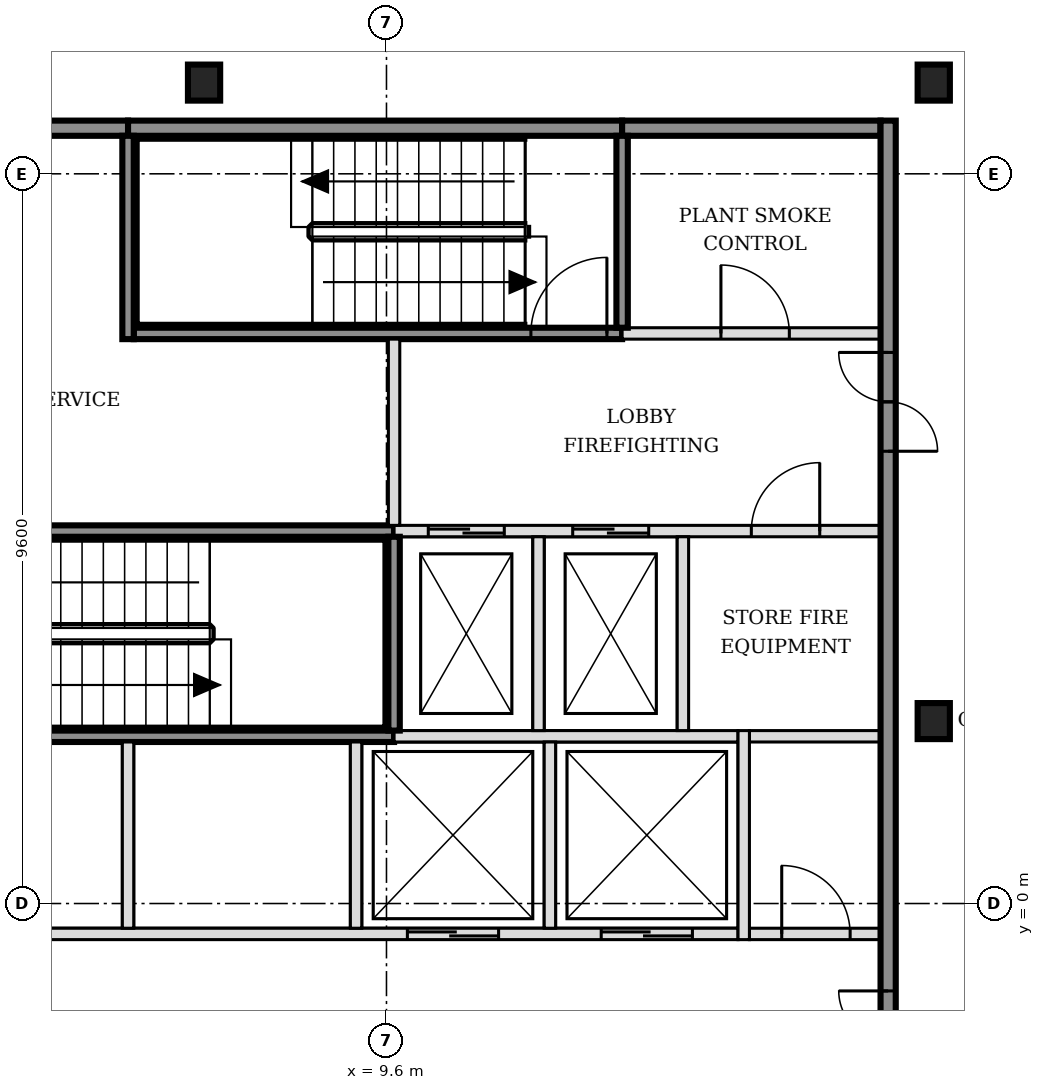
"""IFC4 building model, lengths in metres.
Left out: names, types, materials, properties, quantities, classifications, styles, units other than length and angle.
Written with IfcOpenShell. Run it as: python <this file> out.ifc"""

import sys

from ifc_helpers import new_model, si_unit, direction, frame, frame_2d, origin, origin_2d, place, context, subcontext, project, spatial, rectangle, i_section, extrude, element, fill, save


model = new_model("IFC4")
c1 = context("Model", 3, precision=1e-05, world=origin(), true_north=direction((0.0, 1.0)))
c2 = subcontext(c1, "Body", "Model", "MODEL_VIEW")
j1 = project(units=[si_unit("LENGTHUNIT", "METRE"), si_unit("PLANEANGLEUNIT", "RADIAN")], contexts=[c1])
p1 = place(None, origin())
s1 = spatial("IfcSite", under=j1, at=p1, CompositionType="ELEMENT")
p2 = place(p1, origin())
s2 = spatial("IfcBuilding", under=s1, at=p2, CompositionType="ELEMENT")
p3 = place(p2, frame((0.0, 0.0, 108.6)))
s3 = spatial("IfcBuildingStorey", under=s2, at=p3, CompositionType="ELEMENT", Elevation=108.6)
for number, where, z_axis, x_axis in (
    (1, (16.8, 2.4, -0.15), (0.0, 0.0, 1.0), (1.0, 0.0, 0.0)),
    (2, (7.2, 10.8, -0.15), (0.0, 0.0, 1.0), (1.0, 0.0, 0.0)),
    (3, (16.8, 10.8, -0.15), (0.0, 0.0, 1.0), (1.0, 0.0, 0.0)),
):
    element("IfcColumn", number, at=place(p3, frame(where, z_axis=z_axis, x_axis=x_axis)), inside=s3, PredefinedType="COLUMN", context=c2, shape_type="SweptSolid", body=[
        extrude(i_section(OverallWidth=0.424, OverallDepth=0.474, WebThickness=0.048, FlangeThickness=0.077, FilletRadius=0.015, at=origin_2d()), origin(), (0.0, 0.0, 1.0), 3.6),
    ])
p4 = place(p3, frame((-1.7, -0.4, 0.0), z_axis=(0.0, 0.0, 1.0), x_axis=(1.0, 0.0, 0.0)))
e4 = element("IfcWall", 4, at=p4, inside=s3, PredefinedType="SOLIDWALL", context=c2, shape_type="SweptSolid", body=[
    extrude(rectangle(XDim=15.925, YDim=0.15, at=frame_2d((7.962, 0.0))), origin(), (0.0, 0.0, 1.0), 3.45),
])
p5 = place(p4, frame((0.6, 0.0, 0.0)))
e5 = element("IfcOpeningElement", 5, at=p5, cuts=e4, PredefinedType="OPENING", context=c2, shape_type="SweptSolid", body=[
    extrude(rectangle(XDim=1.1, YDim=2.1, at=frame_2d((0.55, 1.05))), frame((0.0, 0.085, 0.0), z_axis=(0.0, -1.0, 0.0), x_axis=(1.0, 0.0, 0.0)), (0.0, 0.0, 1.0), 0.17),
])
p6 = place(p4, frame((3.1, 0.0, 0.0)))
e6 = element("IfcOpeningElement", 6, at=p6, cuts=e4, PredefinedType="OPENING", context=c2, shape_type="SweptSolid", body=[
    extrude(rectangle(XDim=1.1, YDim=2.1, at=frame_2d((0.55, 1.05))), frame((0.0, 0.085, 0.0), z_axis=(0.0, -1.0, 0.0), x_axis=(1.0, 0.0, 0.0)), (0.0, 0.0, 1.0), 0.17),
])
p7 = place(p4, frame((11.575, 0.0, 0.0)))
e7 = element("IfcOpeningElement", 7, at=p7, cuts=e4, PredefinedType="OPENING", context=c2, shape_type="SweptSolid", body=[
    extrude(rectangle(XDim=1.2, YDim=2.1, at=frame_2d((0.6, 1.05))), frame((0.0, 0.085, 0.0), z_axis=(0.0, -1.0, 0.0), x_axis=(1.0, 0.0, 0.0)), (0.0, 0.0, 1.0), 0.17),
])
p8 = place(p4, frame((14.125, 0.0, 0.0)))
e8 = element("IfcOpeningElement", 8, at=p8, cuts=e4, PredefinedType="OPENING", context=c2, shape_type="SweptSolid", body=[
    extrude(rectangle(XDim=1.2, YDim=2.1, at=frame_2d((0.6, 1.05))), frame((0.0, 0.085, 0.0), z_axis=(0.0, -1.0, 0.0), x_axis=(1.0, 0.0, 0.0)), (0.0, 0.0, 1.0), 0.17),
])
p9 = place(p3, frame((14.375, -0.4, 0.0), z_axis=(0.0, 0.0, 1.0), x_axis=(1.0, 0.0, 0.0)))
e9 = element("IfcWall", 9, at=p9, inside=s3, PredefinedType="PARTITIONING", context=c2, shape_type="SweptSolid", body=[
    extrude(rectangle(XDim=1.725, YDim=0.15, at=frame_2d((0.863, 0.0))), origin(), (0.0, 0.0, 1.0), 3.45),
])
p10 = place(p9, frame((0.425, 0.0, 0.0)))
e10 = element("IfcOpeningElement", 10, at=p10, cuts=e9, PredefinedType="OPENING", context=c2, shape_type="SweptSolid", body=[
    extrude(rectangle(XDim=0.9, YDim=2.1, at=frame_2d((0.45, 1.05))), frame((0.0, 0.085, 0.0), z_axis=(0.0, -1.0, 0.0), x_axis=(1.0, 0.0, 0.0)), (0.0, 0.0, 1.0), 0.17),
])
p11 = place(p3, frame((3.2, 2.2, 0.0), z_axis=(0.0, 0.0, 1.0), x_axis=(1.0, 0.0, 0.0)))
e11 = element("IfcWall", 11, at=p11, inside=s3, PredefinedType="SOLIDWALL", context=c2, shape_type="SweptSolid", body=[
    extrude(rectangle(XDim=6.5, YDim=0.15, at=frame_2d((3.25, 0.0))), origin(), (0.0, 0.0, 1.0), 3.45),
])
p12 = place(p3, frame((9.7, 2.2, 0.0), z_axis=(0.0, 0.0, 1.0), x_axis=(1.0, 0.0, 0.0)))
e12 = element("IfcWall", 12, at=p12, inside=s3, PredefinedType="SOLIDWALL", context=c2, shape_type="SweptSolid", body=[
    extrude(rectangle(XDim=4.525, YDim=0.15, at=frame_2d((2.263, 0.0))), origin(), (0.0, 0.0, 1.0), 3.45),
])
p13 = place(p3, frame((14.375, 2.2, 0.0), z_axis=(0.0, 0.0, 1.0), x_axis=(1.0, 0.0, 0.0)))
e13 = element("IfcWall", 13, at=p13, inside=s3, PredefinedType="PARTITIONING", context=c2, shape_type="SweptSolid", body=[
    extrude(rectangle(XDim=1.725, YDim=0.15, at=frame_2d((0.863, 0.0))), origin(), (0.0, 0.0, 1.0), 3.45),
])
p14 = place(p3, frame((3.275, 4.9, 0.0), z_axis=(0.0, 0.0, 1.0), x_axis=(1.0, 0.0, 0.0)))
e14 = element("IfcWall", 14, at=p14, inside=s3, PredefinedType="SOLIDWALL", context=c2, shape_type="SweptSolid", body=[
    extrude(rectangle(XDim=6.425, YDim=0.15, at=frame_2d((3.212, 0.0))), origin(), (0.0, 0.0, 1.0), 3.45),
])
p15 = place(p14, frame((0.1, 0.0, 0.0)))
e15 = element("IfcOpeningElement", 15, at=p15, cuts=e14, PredefinedType="OPENING", context=c2, shape_type="SweptSolid", body=[
    extrude(rectangle(XDim=1.0, YDim=2.1, at=frame_2d((0.5, 1.05))), frame((0.0, 0.085, 0.0), z_axis=(0.0, -1.0, 0.0), x_axis=(1.0, 0.0, 0.0)), (0.0, 0.0, 1.0), 0.17),
])
p16 = place(p3, frame((9.7, 4.9, 0.0), z_axis=(0.0, 0.0, 1.0), x_axis=(1.0, 0.0, 0.0)))
e16 = element("IfcWall", 16, at=p16, inside=s3, PredefinedType="SOLIDWALL", context=c2, shape_type="SweptSolid", body=[
    extrude(rectangle(XDim=6.4, YDim=0.15, at=frame_2d((3.2, 0.0))), origin(), (0.0, 0.0, 1.0), 3.45),
])
p17 = place(p16, frame((0.45, 0.0, 0.0)))
e17 = element("IfcOpeningElement", 17, at=p17, cuts=e16, PredefinedType="OPENING", context=c2, shape_type="SweptSolid", body=[
    extrude(rectangle(XDim=1.0, YDim=2.1, at=frame_2d((0.5, 1.05))), frame((0.0, 0.085, 0.0), z_axis=(0.0, -1.0, 0.0), x_axis=(1.0, 0.0, 0.0)), (0.0, 0.0, 1.0), 0.17),
])
p18 = place(p16, frame((2.35, 0.0, 0.0)))
e18 = element("IfcOpeningElement", 18, at=p18, cuts=e16, PredefinedType="OPENING", context=c2, shape_type="SweptSolid", body=[
    extrude(rectangle(XDim=1.0, YDim=2.1, at=frame_2d((0.5, 1.05))), frame((0.0, 0.085, 0.0), z_axis=(0.0, -1.0, 0.0), x_axis=(1.0, 0.0, 0.0)), (0.0, 0.0, 1.0), 0.17),
])
p19 = place(p16, frame((4.7, 0.0, 0.0)))
e19 = element("IfcOpeningElement", 19, at=p19, cuts=e16, PredefinedType="OPENING", context=c2, shape_type="SweptSolid", body=[
    extrude(rectangle(XDim=0.9, YDim=2.1, at=frame_2d((0.45, 1.05))), frame((0.0, 0.085, 0.0), z_axis=(0.0, -1.0, 0.0), x_axis=(1.0, 0.0, 0.0)), (0.0, 0.0, 1.0), 0.17),
])
p20 = place(p3, frame((6.275, 7.5, 0.0), z_axis=(0.0, 0.0, 1.0), x_axis=(1.0, 0.0, 0.0)))
e20 = element("IfcWall", 20, at=p20, inside=s3, PredefinedType="SOLIDWALL", context=c2, shape_type="SweptSolid", body=[
    extrude(rectangle(XDim=6.425, YDim=0.15, at=frame_2d((3.212, 0.0))), origin(), (0.0, 0.0, 1.0), 3.45),
])
p21 = place(p20, frame((5.225, 0.0, 0.0)))
e21 = element("IfcOpeningElement", 21, at=p21, cuts=e20, PredefinedType="OPENING", context=c2, shape_type="SweptSolid", body=[
    extrude(rectangle(XDim=1.0, YDim=2.1, at=frame_2d((0.5, 1.05))), frame((0.0, 0.085, 0.0), z_axis=(0.0, -1.0, 0.0), x_axis=(1.0, 0.0, 0.0)), (0.0, 0.0, 1.0), 0.17),
])
p22 = place(p3, frame((12.7, 7.5, 0.0), z_axis=(0.0, 0.0, 1.0), x_axis=(1.0, 0.0, 0.0)))
e22 = element("IfcWall", 22, at=p22, inside=s3, PredefinedType="SOLIDWALL", context=c2, shape_type="SweptSolid", body=[
    extrude(rectangle(XDim=3.4, YDim=0.15, at=frame_2d((1.7, 0.0))), origin(), (0.0, 0.0, 1.0), 3.45),
])
p23 = place(p22, frame((1.3, 0.0, 0.0)))
e23 = element("IfcOpeningElement", 23, at=p23, cuts=e22, PredefinedType="OPENING", context=c2, shape_type="SweptSolid", body=[
    extrude(rectangle(XDim=0.9, YDim=2.1, at=frame_2d((0.45, 1.05))), frame((0.0, 0.085, 0.0), z_axis=(0.0, -1.0, 0.0), x_axis=(1.0, 0.0, 0.0)), (0.0, 0.0, 1.0), 0.17),
])
p24 = place(p3, frame((-1.7, 10.2, 0.0), z_axis=(0.0, 0.0, 1.0), x_axis=(1.0, 0.0, 0.0)))
e24 = element("IfcWall", 24, at=p24, inside=s3, PredefinedType="SOLIDWALL", context=c2, shape_type="SweptSolid", body=[
    extrude(rectangle(XDim=7.9, YDim=0.2, at=frame_2d((3.95, 0.0))), origin(), (0.0, 0.0, 1.0), 3.45),
])
p25 = place(p3, frame((6.2, 10.2, 0.0), z_axis=(0.0, 0.0, 1.0), x_axis=(1.0, 0.0, 0.0)))
e25 = element("IfcWall", 25, at=p25, inside=s3, PredefinedType="SOLIDWALL", context=c2, shape_type="SweptSolid", body=[
    extrude(rectangle(XDim=6.5, YDim=0.2, at=frame_2d((3.25, 0.0))), origin(), (0.0, 0.0, 1.0), 3.45),
])
p26 = place(p3, frame((12.7, 10.2, 0.0), z_axis=(0.0, 0.0, 1.0), x_axis=(1.0, 0.0, 0.0)))
e26 = element("IfcWall", 26, at=p26, inside=s3, PredefinedType="SOLIDWALL", context=c2, shape_type="SweptSolid", body=[
    extrude(rectangle(XDim=3.4, YDim=0.2, at=frame_2d((1.7, 0.0))), origin(), (0.0, 0.0, 1.0), 3.45),
])
p27 = place(p3, frame((6.2, -0.325, 0.0), z_axis=(0.0, 0.0, 1.0), x_axis=(0.0, 1.0, 0.0)))
e27 = element("IfcWall", 27, at=p27, inside=s3, PredefinedType="SOLIDWALL", context=c2, shape_type="SweptSolid", body=[
    extrude(rectangle(XDim=2.45, YDim=0.15, at=frame_2d((1.225, 0.0))), origin(), (0.0, 0.0, 1.0), 3.45),
])
p28 = place(p3, frame((6.2, 7.425, 0.0), z_axis=(0.0, 0.0, 1.0), x_axis=(0.0, 1.0, 0.0)))
e28 = element("IfcWall", 28, at=p28, inside=s3, PredefinedType="SOLIDWALL", context=c2, shape_type="SweptSolid", body=[
    extrude(rectangle(XDim=2.675, YDim=0.15, at=frame_2d((1.337, 0.0))), origin(), (0.0, 0.0, 1.0), 3.45),
])
p29 = place(p3, frame((9.2, -0.325, 0.0), z_axis=(0.0, 0.0, 1.0), x_axis=(0.0, 1.0, 0.0)))
e29 = element("IfcWall", 29, at=p29, inside=s3, PredefinedType="SOLIDWALL", context=c2, shape_type="SweptSolid", body=[
    extrude(rectangle(XDim=2.45, YDim=0.15, at=frame_2d((1.225, 0.0))), origin(), (0.0, 0.0, 1.0), 3.45),
])
p30 = place(p3, frame((9.7, 2.275, 0.0), z_axis=(0.0, 0.0, 1.0), x_axis=(0.0, 1.0, 0.0)))
e30 = element("IfcWall", 30, at=p30, inside=s3, PredefinedType="SOLIDWALL", context=c2, shape_type="SweptSolid", body=[
    extrude(rectangle(XDim=2.55, YDim=0.15, at=frame_2d((1.275, 0.0))), origin(), (0.0, 0.0, 1.0), 3.45),
])
p31 = place(p3, frame((9.7, 4.975, 0.0), z_axis=(0.0, 0.0, 1.0), x_axis=(0.0, 1.0, 0.0)))
e31 = element("IfcWall", 31, at=p31, inside=s3, PredefinedType="SOLIDWALL", context=c2, shape_type="SweptSolid", body=[
    extrude(rectangle(XDim=2.45, YDim=0.15, at=frame_2d((1.225, 0.0))), origin(), (0.0, 0.0, 1.0), 3.45),
])
p32 = place(p3, frame((11.6, 2.275, 0.0), z_axis=(0.0, 0.0, 1.0), x_axis=(0.0, 1.0, 0.0)))
e32 = element("IfcWall", 32, at=p32, inside=s3, PredefinedType="SOLIDWALL", context=c2, shape_type="SweptSolid", body=[
    extrude(rectangle(XDim=2.55, YDim=0.15, at=frame_2d((1.275, 0.0))), origin(), (0.0, 0.0, 1.0), 3.45),
])
p33 = place(p3, frame((11.75, -0.325, 0.0), z_axis=(0.0, 0.0, 1.0), x_axis=(0.0, 1.0, 0.0)))
e33 = element("IfcWall", 33, at=p33, inside=s3, PredefinedType="SOLIDWALL", context=c2, shape_type="SweptSolid", body=[
    extrude(rectangle(XDim=2.45, YDim=0.15, at=frame_2d((1.225, 0.0))), origin(), (0.0, 0.0, 1.0), 3.45),
])
p34 = place(p3, frame((12.7, 7.575, 0.0), z_axis=(0.0, 0.0, 1.0), x_axis=(0.0, 1.0, 0.0)))
e34 = element("IfcWall", 34, at=p34, inside=s3, PredefinedType="SOLIDWALL", context=c2, shape_type="SweptSolid", body=[
    extrude(rectangle(XDim=2.525, YDim=0.15, at=frame_2d((1.263, 0.0))), origin(), (0.0, 0.0, 1.0), 3.45),
])
p35 = place(p3, frame((13.5, 2.275, 0.0), z_axis=(0.0, 0.0, 1.0), x_axis=(0.0, 1.0, 0.0)))
e35 = element("IfcWall", 35, at=p35, inside=s3, PredefinedType="SOLIDWALL", context=c2, shape_type="SweptSolid", body=[
    extrude(rectangle(XDim=2.55, YDim=0.15, at=frame_2d((1.275, 0.0))), origin(), (0.0, 0.0, 1.0), 3.45),
])
p36 = place(p3, frame((14.3, -0.475, 0.0), z_axis=(0.0, 0.0, 1.0), x_axis=(0.0, 1.0, 0.0)))
e36 = element("IfcWall", 36, at=p36, inside=s3, PredefinedType="SOLIDWALL", context=c2, shape_type="SweptSolid", body=[
    extrude(rectangle(XDim=2.75, YDim=0.15, at=frame_2d((1.375, 0.0))), origin(), (0.0, 0.0, 1.0), 3.45),
])
p37 = place(p3, frame((16.2, -5.5, 0.0), z_axis=(0.0, 0.0, 1.0), x_axis=(0.0, 1.0, 0.0)))
e37 = element("IfcWall", 37, at=p37, inside=s3, PredefinedType="SOLIDWALL", context=c2, shape_type="SweptSolid", body=[
    extrude(rectangle(XDim=15.8, YDim=0.2, at=frame_2d((7.9, 0.0))), origin(), (0.0, 0.0, 1.0), 3.45),
])
p38 = place(p37, frame((3.05, 0.0, 0.0)))
e38 = element("IfcOpeningElement", 38, at=p38, cuts=e37, PredefinedType="OPENING", context=c2, shape_type="SweptSolid", body=[
    extrude(rectangle(XDim=1.3, YDim=2.1, at=frame_2d((0.65, 1.05))), frame((0.0, 0.11, 0.0), z_axis=(0.0, -1.0, 0.0), x_axis=(1.0, 0.0, 0.0)), (0.0, 0.0, 1.0), 0.22),
])
p39 = place(p37, frame((11.45, 0.0, 0.0)))
e39 = element("IfcOpeningElement", 39, at=p39, cuts=e37, PredefinedType="OPENING", context=c2, shape_type="SweptSolid", body=[
    extrude(rectangle(XDim=1.3, YDim=2.1, at=frame_2d((0.65, 1.05))), frame((0.0, 0.11, 0.0), z_axis=(0.0, -1.0, 0.0), x_axis=(1.0, 0.0, 0.0)), (0.0, 0.0, 1.0), 0.22),
])
p40 = place(p7, origin())
e40 = element("IfcDoor", 40, at=p40, inside=s3, OperationType="DOUBLE_DOOR_SLIDING", PredefinedType="DOOR", context=c2, shape_type="SweptSolid", body=[
    extrude(rectangle(XDim=1.2, YDim=2.1, at=frame_2d((0.6, 1.05))), frame((0.0, 0.025, 0.0), z_axis=(0.0, -1.0, 0.0), x_axis=(1.0, 0.0, 0.0)), (0.0, 0.0, 1.0), 0.05),
])
fill(e7, e40)
p41 = place(p8, origin())
e41 = element("IfcDoor", 41, at=p41, inside=s3, OperationType="DOUBLE_DOOR_SLIDING", PredefinedType="DOOR", context=c2, shape_type="SweptSolid", body=[
    extrude(rectangle(XDim=1.2, YDim=2.1, at=frame_2d((0.6, 1.05))), frame((0.0, 0.025, 0.0), z_axis=(0.0, -1.0, 0.0), x_axis=(1.0, 0.0, 0.0)), (0.0, 0.0, 1.0), 0.05),
])
fill(e8, e41)
p42 = place(p17, origin())
e42 = element("IfcDoor", 42, at=p42, inside=s3, OperationType="DOUBLE_DOOR_SLIDING", PredefinedType="DOOR", context=c2, shape_type="SweptSolid", body=[
    extrude(rectangle(XDim=1.0, YDim=2.1, at=frame_2d((0.5, 1.05))), frame((0.0, 0.025, 0.0), z_axis=(0.0, -1.0, 0.0), x_axis=(1.0, 0.0, 0.0)), (0.0, 0.0, 1.0), 0.05),
])
fill(e17, e42)
p43 = place(p18, origin())
e43 = element("IfcDoor", 43, at=p43, inside=s3, OperationType="DOUBLE_DOOR_SLIDING", PredefinedType="DOOR", context=c2, shape_type="SweptSolid", body=[
    extrude(rectangle(XDim=1.0, YDim=2.1, at=frame_2d((0.5, 1.05))), frame((0.0, 0.025, 0.0), z_axis=(0.0, -1.0, 0.0), x_axis=(1.0, 0.0, 0.0)), (0.0, 0.0, 1.0), 0.05),
])
fill(e18, e43)
p44 = place(p21, origin())
e44 = element("IfcDoor", 44, at=p44, inside=s3, OperationType="SINGLE_SWING_RIGHT", PredefinedType="DOOR", context=c2, shape_type="SweptSolid", body=[
    extrude(rectangle(XDim=1.0, YDim=2.1, at=frame_2d((0.5, 1.05))), frame((0.0, 0.025, 0.0), z_axis=(0.0, -1.0, 0.0), x_axis=(1.0, 0.0, 0.0)), (0.0, 0.0, 1.0), 0.05),
])
fill(e21, e44)
p45 = place(p38, origin())
e45 = element("IfcDoor", 45, at=p45, inside=s3, OperationType="DOUBLE_DOOR_SINGLE_SWING", PredefinedType="DOOR", context=c2, shape_type="SweptSolid", body=[
    extrude(rectangle(XDim=1.3, YDim=2.1, at=frame_2d((0.65, 1.05))), frame((0.0, 0.025, 0.0), z_axis=(0.0, -1.0, 0.0), x_axis=(1.0, 0.0, 0.0)), (0.0, 0.0, 1.0), 0.05),
])
fill(e38, e45)
p46 = place(p39, origin())
e46 = element("IfcDoor", 46, at=p46, inside=s3, OperationType="DOUBLE_DOOR_SINGLE_SWING", PredefinedType="DOOR", context=c2, shape_type="SweptSolid", body=[
    extrude(rectangle(XDim=1.3, YDim=2.1, at=frame_2d((0.65, 1.05))), frame((0.0, 0.025, 0.0), z_axis=(0.0, -1.0, 0.0), x_axis=(1.0, 0.0, 0.0)), (0.0, 0.0, 1.0), 0.05),
])
fill(e39, e46)
p47 = place(p10, origin())
e47 = element("IfcDoor", 47, at=p47, inside=s3, OperationType="SINGLE_SWING_LEFT", PredefinedType="DOOR", context=c2, shape_type="SweptSolid", body=[
    extrude(rectangle(XDim=0.9, YDim=2.1, at=frame_2d((0.45, 1.05))), frame((0.0, 0.025, 0.0), z_axis=(0.0, -1.0, 0.0), x_axis=(1.0, 0.0, 0.0)), (0.0, 0.0, 1.0), 0.05),
])
fill(e10, e47)
p48 = place(p19, origin())
e48 = element("IfcDoor", 48, at=p48, inside=s3, OperationType="SINGLE_SWING_RIGHT", PredefinedType="DOOR", context=c2, shape_type="SweptSolid", body=[
    extrude(rectangle(XDim=0.9, YDim=2.1, at=frame_2d((0.45, 1.05))), frame((0.0, 0.025, 0.0), z_axis=(0.0, -1.0, 0.0), x_axis=(1.0, 0.0, 0.0)), (0.0, 0.0, 1.0), 0.05),
])
fill(e19, e48)
p49 = place(p23, origin())
e49 = element("IfcDoor", 49, at=p49, inside=s3, OperationType="SINGLE_SWING_LEFT", PredefinedType="DOOR", context=c2, shape_type="SweptSolid", body=[
    extrude(rectangle(XDim=0.9, YDim=2.1, at=frame_2d((0.45, 1.05))), frame((0.0, 0.025, 0.0), z_axis=(0.0, -1.0, 0.0), x_axis=(1.0, 0.0, 0.0)), (0.0, 0.0, 1.0), 0.05),
])
fill(e23, e49)
save(model, sys.argv[1])
